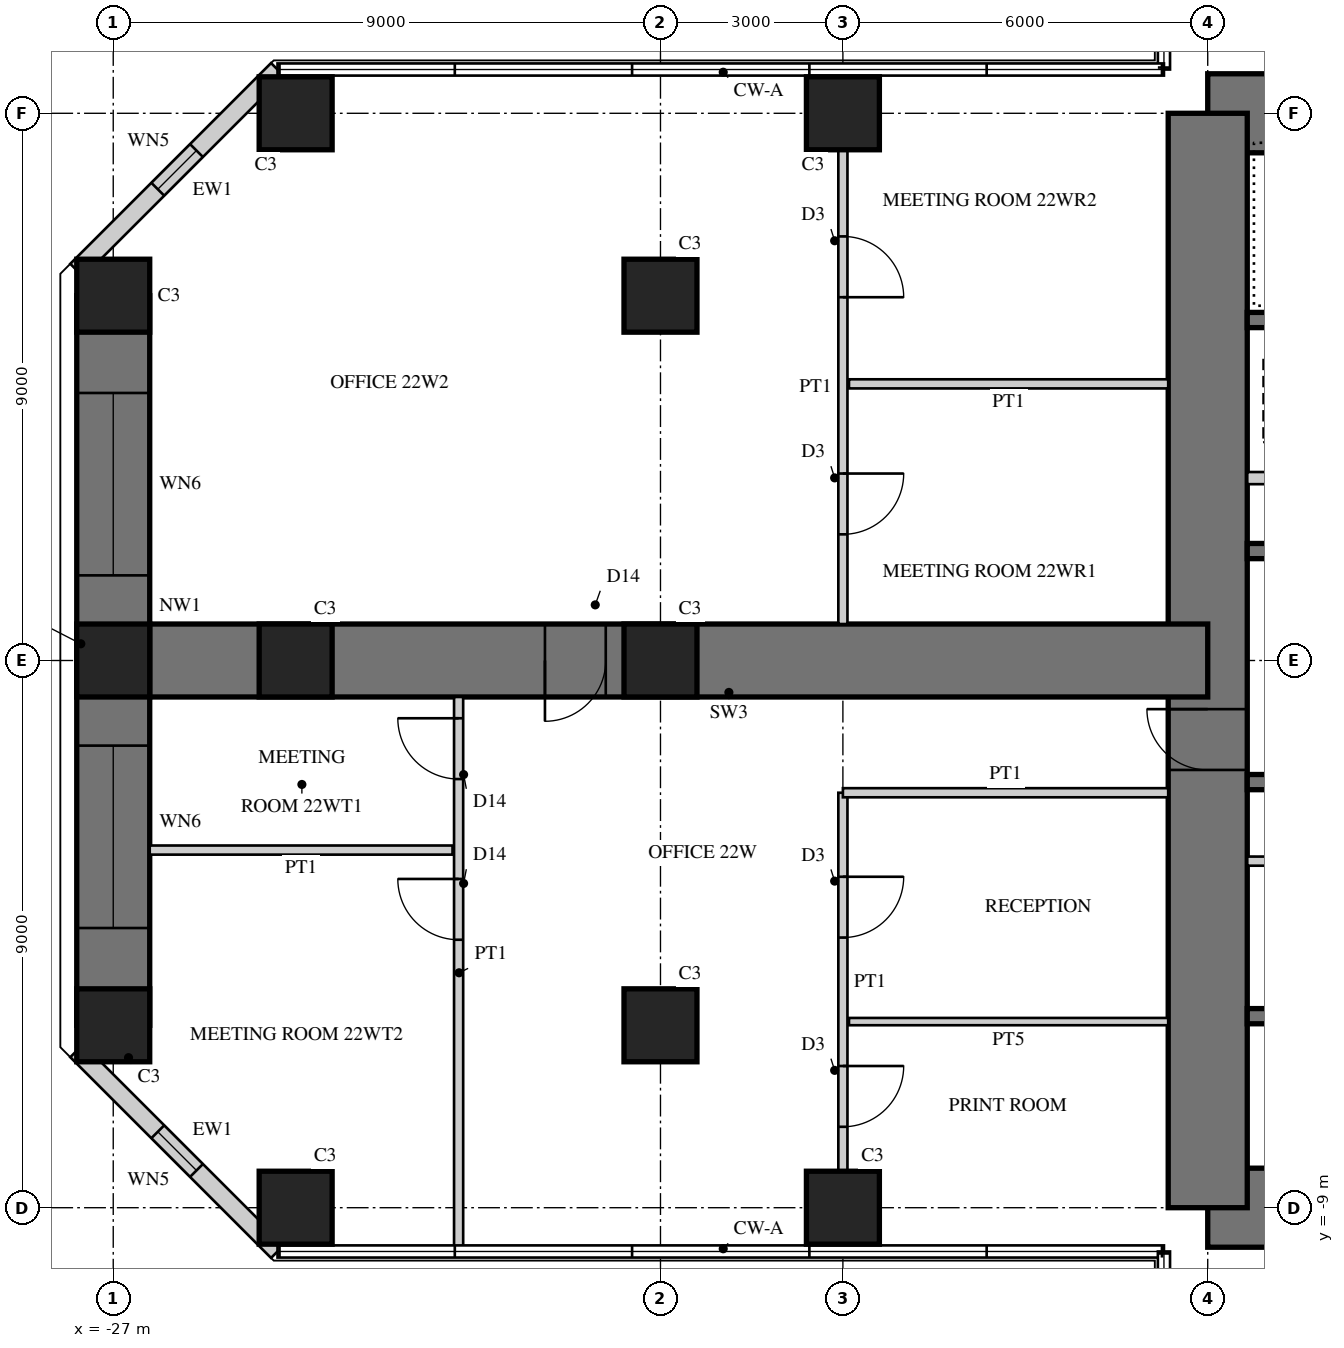
"""IFC4 building model, lengths in metres.
Left out: names, types, materials, properties, quantities, classifications, styles, units other than length and angle.
Written with IfcOpenShell. Run it as: python <this file> out.ifc"""

import sys

from ifc_helpers import new_model, si_unit, direction, frame, frame_2d, origin, origin_2d, place, context, subcontext, project, spatial, rectangle, hollow_rectangle, extrude, element, fill, save


model = new_model("IFC4")
c1 = context("Model", 3, precision=1e-05, world=origin(), true_north=direction((0.0, 1.0)))
c2 = subcontext(c1, "Body", "Model", "MODEL_VIEW")
j1 = project(units=[si_unit("LENGTHUNIT", "METRE"), si_unit("PLANEANGLEUNIT", "RADIAN")], contexts=[c1])
p1 = place(None, origin())
s1 = spatial("IfcSite", under=j1, at=p1, CompositionType="ELEMENT")
p2 = place(p1, origin())
s2 = spatial("IfcBuilding", under=s1, at=p2, CompositionType="ELEMENT")
p3 = place(p2, frame((0.0, 0.0, 91.5)))
s3 = spatial("IfcBuildingStorey", under=s2, at=p3, CompositionType="ELEMENT", Elevation=91.5)
p4 = place(p3, frame((9.0, 9.0, 0.0), z_axis=(0.0, 0.0, 1.0), x_axis=(-1.0, 0.0, 0.0)))
e1 = element("IfcWall", 1, at=p4, inside=s3, PredefinedType="SHEAR", context=c2, shape_type="SweptSolid", body=[
    extrude(rectangle(XDim=18.0, YDim=1.3, at=frame_2d((9.0, 0.0))), origin(), (0.0, 0.0, 1.0), 4.0),
])
p5 = place(p4, frame((9.8, 0.0, 0.0)))
e2 = element("IfcOpeningElement", 2, at=p5, cuts=e1, PredefinedType="OPENING", context=c2, shape_type="SweptSolid", body=[
    extrude(rectangle(XDim=1.0, YDim=2.4, at=frame_2d((0.5, 1.2))), frame((0.0, 0.66, 0.0), z_axis=(0.0, -1.0, 0.0), x_axis=(1.0, 0.0, 0.0)), (0.0, 0.0, 1.0), 1.32),
])
p6 = place(p3, frame((-9.0, -9.0, 0.0), z_axis=(0.0, 0.0, 1.0), x_axis=(1.0, 0.0, 0.0)))
e3 = element("IfcWall", 3, at=p6, inside=s3, PredefinedType="SHEAR", context=c2, shape_type="SweptSolid", body=[
    extrude(rectangle(XDim=18.0, YDim=1.3, at=frame_2d((9.0, 0.0))), origin(), (0.0, 0.0, 1.0), 4.0),
])
p7 = place(p6, frame((9.8, 0.0, 0.0)))
e4 = element("IfcOpeningElement", 4, at=p7, cuts=e3, PredefinedType="OPENING", context=c2, shape_type="SweptSolid", body=[
    extrude(rectangle(XDim=1.0, YDim=2.4, at=frame_2d((0.5, 1.2))), frame((0.0, 0.66, 0.0), z_axis=(0.0, -1.0, 0.0), x_axis=(1.0, 0.0, 0.0)), (0.0, 0.0, 1.0), 1.32),
])
p8 = place(p3, frame((-9.0, 9.0, 0.0), z_axis=(0.0, 0.0, 1.0), x_axis=(0.0, -1.0, 0.0)))
e5 = element("IfcWall", 5, at=p8, inside=s3, PredefinedType="SHEAR", context=c2, shape_type="SweptSolid", body=[
    extrude(rectangle(XDim=18.0, YDim=1.3, at=frame_2d((9.0, 0.0))), origin(), (0.0, 0.0, 1.0), 4.0),
])
p9 = place(p8, frame((9.8, 0.0, 0.0)))
e6 = element("IfcOpeningElement", 6, at=p9, cuts=e5, PredefinedType="OPENING", context=c2, shape_type="SweptSolid", body=[
    extrude(rectangle(XDim=1.0, YDim=2.4, at=frame_2d((0.5, 1.2))), frame((0.0, 0.66, 0.0), z_axis=(0.0, -1.0, 0.0), x_axis=(1.0, 0.0, 0.0)), (0.0, 0.0, 1.0), 1.32),
])
p10 = place(p3, frame((-2.125, 1.8, 0.0), z_axis=(0.0, 0.0, 1.0), x_axis=(-1.0, 0.0, 0.0)))
e7 = element("IfcWall", 7, at=p10, inside=s3, PredefinedType="SHEAR", context=c2, shape_type="SweptSolid", body=[
    extrude(rectangle(XDim=6.225, YDim=0.25, at=frame_2d((3.113, 0.0))), origin(), (0.0, 0.0, 1.0), 4.0),
])
p11 = place(p3, frame((-2.125, 5.6, 0.0), z_axis=(0.0, 0.0, 1.0), x_axis=(-1.0, 0.0, 0.0)))
e8 = element("IfcWall", 8, at=p11, inside=s3, PredefinedType="SHEAR", context=c2, shape_type="SweptSolid", body=[
    extrude(rectangle(XDim=6.225, YDim=0.25, at=frame_2d((3.113, 0.0))), origin(), (0.0, 0.0, 1.0), 4.0),
])
p12 = place(p11, frame((0.175, 0.0, 0.0)))
e9 = element("IfcOpeningElement", 9, at=p12, cuts=e8, PredefinedType="OPENING", context=c2, shape_type="SweptSolid", body=[
    extrude(rectangle(XDim=1.0, YDim=2.1, at=frame_2d((0.5, 1.05))), frame((0.0, 0.135, 0.0), z_axis=(0.0, -1.0, 0.0), x_axis=(1.0, 0.0, 0.0)), (0.0, 0.0, 1.0), 0.27),
])
p13 = place(p3, frame((-5.725, 3.0, 0.0), z_axis=(0.0, 0.0, 1.0), x_axis=(-1.0, 0.0, 0.0)))
e10 = element("IfcWall", 10, at=p13, inside=s3, PredefinedType="PARTITIONING", context=c2, shape_type="SweptSolid", body=[
    extrude(rectangle(XDim=2.625, YDim=0.2, at=frame_2d((1.312, 0.0))), origin(), (0.0, 0.0, 1.0), 4.0),
])
for number, where, z_axis, x_axis in (
    (11, (-1.925, -2.0, 0.0), (0.0, 0.0, 1.0), (-1.0, 0.0, 0.0)),
    (12, (-1.925, -5.85, 0.0), (0.0, 0.0, 1.0), (-1.0, 0.0, 0.0)),
):
    element("IfcWall", number, at=place(p3, frame(where, z_axis=z_axis, x_axis=x_axis)), inside=s3, PredefinedType="SHEAR", context=c2, shape_type="SweptSolid", body=[
        extrude(rectangle(XDim=6.425, YDim=0.25, at=frame_2d((3.212, 0.0))), origin(), (0.0, 0.0, 1.0), 4.0),
    ])
p14 = place(p3, frame((-1.925, -3.3, 0.0), z_axis=(0.0, 0.0, 1.0), x_axis=(-1.0, 0.0, 0.0)))
e13 = element("IfcWall", 13, at=p14, inside=s3, PredefinedType="PARTITIONING", context=c2, shape_type="SweptSolid", body=[
    extrude(rectangle(XDim=6.425, YDim=0.15, at=frame_2d((3.212, 0.0))), origin(), (0.0, 0.0, 1.0), 4.0),
])
p15 = place(p14, frame((0.075, 0.0, 0.0)))
e14 = element("IfcOpeningElement", 14, at=p15, cuts=e13, PredefinedType="OPENING", context=c2, shape_type="SweptSolid", body=[
    extrude(rectangle(XDim=0.8, YDim=2.1, at=frame_2d((0.4, 1.05))), frame((0.0, 0.085, 0.0), z_axis=(0.0, -1.0, 0.0), x_axis=(1.0, 0.0, 0.0)), (0.0, 0.0, 1.0), 0.17),
])
p16 = place(p14, frame((3.675, 0.0, 0.0)))
e15 = element("IfcOpeningElement", 15, at=p16, cuts=e13, PredefinedType="OPENING", context=c2, shape_type="SweptSolid", body=[
    extrude(rectangle(XDim=0.8, YDim=2.1, at=frame_2d((0.4, 1.05))), frame((0.0, 0.085, 0.0), z_axis=(0.0, -1.0, 0.0), x_axis=(1.0, 0.0, 0.0)), (0.0, 0.0, 1.0), 0.17),
])
p17 = place(p3, frame((-9.0, 0.0, 0.0), z_axis=(0.0, 0.0, 1.0), x_axis=(-1.0, 0.0, 0.0)))
e16 = element("IfcWall", 16, at=p17, inside=s3, PredefinedType="SHEAR", context=c2, shape_type="SweptSolid", body=[
    extrude(rectangle(XDim=18.0, YDim=1.2, at=frame_2d((9.0, 0.0))), origin(), (0.0, 0.0, 1.0), 4.0),
])
p18 = place(p17, frame((9.9, 0.0, 0.0)))
e17 = element("IfcOpeningElement", 17, at=p18, cuts=e16, PredefinedType="OPENING", context=c2, shape_type="SweptSolid", body=[
    extrude(rectangle(XDim=1.0, YDim=2.2, at=frame_2d((0.5, 1.1))), frame((0.0, 0.61, 0.0), z_axis=(0.0, -1.0, 0.0), x_axis=(1.0, 0.0, 0.0)), (0.0, 0.0, 1.0), 1.22),
])
p19 = place(p3, frame((-27.0, 6.0, 0.0), z_axis=(0.0, 0.0, 1.0), x_axis=(0.0, -1.0, 0.0)))
e18 = element("IfcWall", 18, at=p19, inside=s3, PredefinedType="SHEAR", context=c2, shape_type="SweptSolid", body=[
    extrude(rectangle(XDim=12.0, YDim=1.2, at=frame_2d((6.0, 0.0))), origin(), (0.0, 0.0, 1.0), 4.0),
])
p20 = place(p19, frame((1.6, 0.0, 0.6)))
e19 = element("IfcOpeningElement", 19, at=p20, cuts=e18, PredefinedType="OPENING", context=c2, shape_type="SweptSolid", body=[
    extrude(rectangle(XDim=3.0, YDim=2.4, at=frame_2d((1.5, 1.2))), frame((0.0, 0.61, 0.0), z_axis=(0.0, -1.0, 0.0), x_axis=(1.0, 0.0, 0.0)), (0.0, 0.0, 1.0), 1.22),
])
p21 = place(p19, frame((7.4, 0.0, 0.6)))
e20 = element("IfcOpeningElement", 20, at=p21, cuts=e18, PredefinedType="OPENING", context=c2, shape_type="SweptSolid", body=[
    extrude(rectangle(XDim=3.0, YDim=2.4, at=frame_2d((1.5, 1.2))), frame((0.0, 0.61, 0.0), z_axis=(0.0, -1.0, 0.0), x_axis=(1.0, 0.0, 0.0)), (0.0, 0.0, 1.0), 1.22),
])
for number, where, z_axis, x_axis in (
    (21, (-15.0, 9.0, 0.0), (0.0, 0.0, 1.0), (1.0, 0.0, 0.0)),
    (22, (-24.0, 9.0, 0.0), (0.0, 0.0, 1.0), (1.0, 0.0, 0.0)),
    (23, (-15.0, -9.0, 0.0), (0.0, 0.0, 1.0), (1.0, 0.0, 0.0)),
    (24, (-24.0, -9.0, 0.0), (0.0, 0.0, 1.0), (1.0, 0.0, 0.0)),
    (25, (-27.0, 6.0, 0.0), (0.0, 0.0, 1.0), (1.0, 0.0, 0.0)),
    (26, (-27.0, 0.0, 0.0), (0.0, 0.0, 1.0), (1.0, 0.0, 0.0)),
    (27, (-27.0, -6.0, 0.0), (0.0, 0.0, 1.0), (1.0, 0.0, 0.0)),
    (28, (-18.0, 6.0, 0.0), (0.0, 0.0, 1.0), (1.0, 0.0, 0.0)),
    (29, (-18.0, 0.0, 0.0), (0.0, 0.0, 1.0), (1.0, 0.0, 0.0)),
    (30, (-18.0, -6.0, 0.0), (0.0, 0.0, 1.0), (1.0, 0.0, 0.0)),
    (31, (-24.0, 0.0, 0.0), (0.0, 0.0, 1.0), (1.0, 0.0, 0.0)),
):
    element("IfcColumn", number, at=place(p3, frame(where, z_axis=z_axis, x_axis=x_axis)), inside=s3, PredefinedType="COLUMN", context=c2, shape_type="SweptSolid", body=[
        extrude(rectangle(XDim=1.2, YDim=1.2, at=origin_2d()), origin(), (0.0, 0.0, 1.0), 4.0),
    ])
p22 = place(p3, frame((-24.298, 9.72, 0.0), z_axis=(0.0, 0.0, 1.0), x_axis=(-0.707106781187, -0.707106781187, 0.0)))
e32 = element("IfcWall", 32, at=p22, inside=s3, PredefinedType="SOLIDWALL", context=c2, shape_type="SweptSolid", body=[
    extrude(rectangle(XDim=4.669, YDim=0.3, at=frame_2d((2.335, 0.0))), origin(), (0.0, 0.0, 1.0), 3.75),
])
p23 = place(p22, frame((1.885, 0.0, 0.3)))
e33 = element("IfcOpeningElement", 33, at=p23, cuts=e32, PredefinedType="OPENING", context=c2, shape_type="SweptSolid", body=[
    extrude(rectangle(XDim=0.9, YDim=2.4, at=frame_2d((0.45, 1.2))), frame((0.0, 0.16, 0.0), z_axis=(0.0, -1.0, 0.0), x_axis=(1.0, 0.0, 0.0)), (0.0, 0.0, 1.0), 0.32),
])
p24 = place(p3, frame((-27.6, -6.418, 0.0), z_axis=(0.0, 0.0, 1.0), x_axis=(0.707106781187, -0.707106781187, 0.0)))
e34 = element("IfcWall", 34, at=p24, inside=s3, PredefinedType="SOLIDWALL", context=c2, shape_type="SweptSolid", body=[
    extrude(rectangle(XDim=4.669, YDim=0.3, at=frame_2d((2.335, 0.0))), origin(), (0.0, 0.0, 1.0), 3.75),
])
p25 = place(p24, frame((1.885, 0.0, 0.3)))
e35 = element("IfcOpeningElement", 35, at=p25, cuts=e34, PredefinedType="OPENING", context=c2, shape_type="SweptSolid", body=[
    extrude(rectangle(XDim=0.9, YDim=2.4, at=frame_2d((0.45, 1.2))), frame((0.0, 0.16, 0.0), z_axis=(0.0, -1.0, 0.0), x_axis=(1.0, 0.0, 0.0)), (0.0, 0.0, 1.0), 0.32),
])
p26 = place(p3, frame((-15.0, -2.175, 0.0), z_axis=(0.0, 0.0, 1.0), x_axis=(0.0, -1.0, 0.0)))
e36 = element("IfcWall", 36, at=p26, inside=s3, PredefinedType="PARTITIONING", context=c2, shape_type="SweptSolid", body=[
    extrude(rectangle(XDim=6.225, YDim=0.15, at=frame_2d((3.112, 0.0))), origin(), (0.0, 0.0, 1.0), 2.7),
])
p27 = place(p26, frame((1.382, 0.0, 0.0)))
e37 = element("IfcOpeningElement", 37, at=p27, cuts=e36, PredefinedType="OPENING", context=c2, shape_type="SweptSolid", body=[
    extrude(rectangle(XDim=1.0, YDim=2.1, at=frame_2d((0.5, 1.05))), frame((0.0, 0.085, 0.0), z_axis=(0.0, -1.0, 0.0), x_axis=(1.0, 0.0, 0.0)), (0.0, 0.0, 1.0), 0.17),
])
p28 = place(p26, frame((4.494, 0.0, 0.0)))
e38 = element("IfcOpeningElement", 38, at=p28, cuts=e36, PredefinedType="OPENING", context=c2, shape_type="SweptSolid", body=[
    extrude(rectangle(XDim=1.0, YDim=2.1, at=frame_2d((0.5, 1.05))), frame((0.0, 0.085, 0.0), z_axis=(0.0, -1.0, 0.0), x_axis=(1.0, 0.0, 0.0)), (0.0, 0.0, 1.0), 0.17),
])
p29 = place(p3, frame((-9.65, -2.175, 0.0), z_axis=(0.0, 0.0, 1.0), x_axis=(-1.0, 0.0, 0.0)))
e39 = element("IfcWall", 39, at=p29, inside=s3, PredefinedType="PARTITIONING", context=c2, shape_type="SweptSolid", body=[
    extrude(rectangle(XDim=5.35, YDim=0.15, at=frame_2d((2.675, 0.0))), origin(), (0.0, 0.0, 1.0), 3.75),
])
p30 = place(p3, frame((-9.65, -5.939, 0.0), z_axis=(0.0, 0.0, 1.0), x_axis=(-1.0, 0.0, 0.0)))
e40 = element("IfcWall", 40, at=p30, inside=s3, PredefinedType="PLUMBINGWALL", context=c2, shape_type="SweptSolid", body=[
    extrude(rectangle(XDim=5.25, YDim=0.12, at=frame_2d((2.625, 0.0))), origin(), (0.0, 0.0, 1.0), 2.8),
])
p31 = place(p3, frame((-15.0, 8.4, 0.0), z_axis=(0.0, 0.0, 1.0), x_axis=(0.0, -1.0, 0.0)))
e41 = element("IfcWall", 41, at=p31, inside=s3, PredefinedType="PARTITIONING", context=c2, shape_type="SweptSolid", body=[
    extrude(rectangle(XDim=7.8, YDim=0.15, at=frame_2d((3.9, 0.0))), origin(), (0.0, 0.0, 1.0), 2.7),
])
p32 = place(p31, frame((1.425, 0.0, 0.0)))
e42 = element("IfcOpeningElement", 42, at=p32, cuts=e41, PredefinedType="OPENING", context=c2, shape_type="SweptSolid", body=[
    extrude(rectangle(XDim=1.0, YDim=2.1, at=frame_2d((0.5, 1.05))), frame((0.0, 0.085, 0.0), z_axis=(0.0, -1.0, 0.0), x_axis=(1.0, 0.0, 0.0)), (0.0, 0.0, 1.0), 0.17),
])
p33 = place(p31, frame((5.325, 0.0, 0.0)))
e43 = element("IfcOpeningElement", 43, at=p33, cuts=e41, PredefinedType="OPENING", context=c2, shape_type="SweptSolid", body=[
    extrude(rectangle(XDim=1.0, YDim=2.1, at=frame_2d((0.5, 1.05))), frame((0.0, 0.085, 0.0), z_axis=(0.0, -1.0, 0.0), x_axis=(1.0, 0.0, 0.0)), (0.0, 0.0, 1.0), 0.17),
])
p34 = place(p3, frame((-9.65, 4.55, 0.0), z_axis=(0.0, 0.0, 1.0), x_axis=(-1.0, 0.0, 0.0)))
e44 = element("IfcWall", 44, at=p34, inside=s3, PredefinedType="PARTITIONING", context=c2, shape_type="SweptSolid", body=[
    extrude(rectangle(XDim=5.25, YDim=0.15, at=frame_2d((2.625, 0.0))), origin(), (0.0, 0.0, 1.0), 3.75),
])
p35 = place(p3, frame((-21.42, -3.118, 0.0), z_axis=(0.0, 0.0, 1.0), x_axis=(-1.0, 0.0, 0.0)))
e45 = element("IfcWall", 45, at=p35, inside=s3, PredefinedType="PARTITIONING", context=c2, shape_type="SweptSolid", body=[
    extrude(rectangle(XDim=4.98, YDim=0.15, at=frame_2d((2.49, 0.0))), origin(), (0.0, 0.0, 1.0), 3.75),
])
p36 = place(p3, frame((-21.32, -0.6, 0.0), z_axis=(0.0, 0.0, 1.0), x_axis=(0.0, -1.0, 0.0)))
e46 = element("IfcWall", 46, at=p36, inside=s3, PredefinedType="PARTITIONING", context=c2, shape_type="SweptSolid", body=[
    extrude(rectangle(XDim=9.08, YDim=0.15, at=frame_2d((4.54, 0.0))), origin(), (0.0, 0.0, 1.0), 3.75),
])
p37 = place(p36, frame((0.35, 0.0, 0.0)))
e47 = element("IfcOpeningElement", 47, at=p37, cuts=e46, PredefinedType="OPENING", context=c2, shape_type="SweptSolid", body=[
    extrude(rectangle(XDim=1.0, YDim=2.2, at=frame_2d((0.5, 1.1))), frame((0.0, 0.085, 0.0), z_axis=(0.0, -1.0, 0.0), x_axis=(1.0, 0.0, 0.0)), (0.0, 0.0, 1.0), 0.17),
])
p38 = place(p36, frame((2.993, 0.0, 0.0)))
e48 = element("IfcOpeningElement", 48, at=p38, cuts=e46, PredefinedType="OPENING", context=c2, shape_type="SweptSolid", body=[
    extrude(rectangle(XDim=1.0, YDim=2.2, at=frame_2d((0.5, 1.1))), frame((0.0, 0.085, 0.0), z_axis=(0.0, -1.0, 0.0), x_axis=(1.0, 0.0, 0.0)), (0.0, 0.0, 1.0), 0.17),
])
p39 = place(p23, origin())
e49 = element("IfcWindow", 49, at=p39, inside=s3, PartitioningType="SINGLE_PANEL", PredefinedType="WINDOW", context=c2, shape_type="SweptSolid", body=[
    extrude(hollow_rectangle(XDim=0.9, YDim=2.4, WallThickness=0.06, at=frame_2d((0.45, 1.2))), frame((0.0, 0.03, 0.0), z_axis=(0.0, -1.0, 0.0), x_axis=(1.0, 0.0, 0.0)), (0.0, 0.0, 1.0), 0.06),
    extrude(rectangle(XDim=0.779, YDim=2.279, at=frame_2d((0.45, 1.2))), frame((0.0, 0.03, 0.0), z_axis=(0.0, -1.0, 0.0), x_axis=(1.0, 0.0, 0.0)), (0.0, 0.0, 1.0), 0.06),
])
fill(e33, e49)
p40 = place(p20, origin())
e50 = element("IfcWindow", 50, at=p40, inside=s3, PartitioningType="SINGLE_PANEL", PredefinedType="WINDOW", context=c2, shape_type="SweptSolid", body=[
    extrude(hollow_rectangle(XDim=3.0, YDim=2.4, WallThickness=0.06, at=frame_2d((1.5, 1.2))), frame((0.0, 0.03, 0.0), z_axis=(0.0, -1.0, 0.0), x_axis=(1.0, 0.0, 0.0)), (0.0, 0.0, 1.0), 0.06),
    extrude(rectangle(XDim=2.879, YDim=2.279, at=frame_2d((1.5, 1.2))), frame((0.0, 0.03, 0.0), z_axis=(0.0, -1.0, 0.0), x_axis=(1.0, 0.0, 0.0)), (0.0, 0.0, 1.0), 0.06),
])
fill(e19, e50)
p41 = place(p21, origin())
e51 = element("IfcWindow", 51, at=p41, inside=s3, PartitioningType="SINGLE_PANEL", PredefinedType="WINDOW", context=c2, shape_type="SweptSolid", body=[
    extrude(hollow_rectangle(XDim=3.0, YDim=2.4, WallThickness=0.06, at=frame_2d((1.5, 1.2))), frame((0.0, 0.03, 0.0), z_axis=(0.0, -1.0, 0.0), x_axis=(1.0, 0.0, 0.0)), (0.0, 0.0, 1.0), 0.06),
    extrude(rectangle(XDim=2.879, YDim=2.279, at=frame_2d((1.5, 1.2))), frame((0.0, 0.03, 0.0), z_axis=(0.0, -1.0, 0.0), x_axis=(1.0, 0.0, 0.0)), (0.0, 0.0, 1.0), 0.06),
])
fill(e20, e51)
p42 = place(p25, origin())
e52 = element("IfcWindow", 52, at=p42, inside=s3, PartitioningType="SINGLE_PANEL", PredefinedType="WINDOW", context=c2, shape_type="SweptSolid", body=[
    extrude(hollow_rectangle(XDim=0.9, YDim=2.4, WallThickness=0.06, at=frame_2d((0.45, 1.2))), frame((0.0, 0.03, 0.0), z_axis=(0.0, -1.0, 0.0), x_axis=(1.0, 0.0, 0.0)), (0.0, 0.0, 1.0), 0.06),
    extrude(rectangle(XDim=0.779, YDim=2.279, at=frame_2d((0.45, 1.2))), frame((0.0, 0.03, 0.0), z_axis=(0.0, -1.0, 0.0), x_axis=(1.0, 0.0, 0.0)), (0.0, 0.0, 1.0), 0.06),
])
fill(e35, e52)
p43 = place(p27, origin())
e53 = element("IfcDoor", 53, at=p43, inside=s3, OperationType="SINGLE_SWING_LEFT", PredefinedType="DOOR", context=c2, shape_type="SweptSolid", body=[
    extrude(rectangle(XDim=1.0, YDim=2.1, at=frame_2d((0.5, 1.05))), frame((0.0, 0.025, 0.0), z_axis=(0.0, -1.0, 0.0), x_axis=(1.0, 0.0, 0.0)), (0.0, 0.0, 1.0), 0.05),
])
fill(e37, e53)
p44 = place(p28, origin())
e54 = element("IfcDoor", 54, at=p44, inside=s3, OperationType="SINGLE_SWING_LEFT", PredefinedType="DOOR", context=c2, shape_type="SweptSolid", body=[
    extrude(rectangle(XDim=1.0, YDim=2.1, at=frame_2d((0.5, 1.05))), frame((0.0, 0.025, 0.0), z_axis=(0.0, -1.0, 0.0), x_axis=(1.0, 0.0, 0.0)), (0.0, 0.0, 1.0), 0.05),
])
fill(e38, e54)
p45 = place(p32, origin())
e55 = element("IfcDoor", 55, at=p45, inside=s3, OperationType="SINGLE_SWING_RIGHT", PredefinedType="DOOR", context=c2, shape_type="SweptSolid", body=[
    extrude(rectangle(XDim=1.0, YDim=2.1, at=frame_2d((0.5, 1.05))), frame((0.0, 0.025, 0.0), z_axis=(0.0, -1.0, 0.0), x_axis=(1.0, 0.0, 0.0)), (0.0, 0.0, 1.0), 0.05),
])
fill(e42, e55)
p46 = place(p33, origin())
e56 = element("IfcDoor", 56, at=p46, inside=s3, OperationType="SINGLE_SWING_LEFT", PredefinedType="DOOR", context=c2, shape_type="SweptSolid", body=[
    extrude(rectangle(XDim=1.0, YDim=2.1, at=frame_2d((0.5, 1.05))), frame((0.0, 0.025, 0.0), z_axis=(0.0, -1.0, 0.0), x_axis=(1.0, 0.0, 0.0)), (0.0, 0.0, 1.0), 0.05),
])
fill(e43, e56)
p47 = place(p37, frame((1.0, 0.0, 0.0), z_axis=(0.0, 0.0, 1.0), x_axis=(-1.0, 0.0, 0.0)))
e57 = element("IfcDoor", 57, at=p47, inside=s3, OperationType="SINGLE_SWING_RIGHT", PredefinedType="DOOR", context=c2, shape_type="SweptSolid", body=[
    extrude(rectangle(XDim=1.0, YDim=2.2, at=frame_2d((0.5, 1.1))), frame((0.0, 0.025, 0.0), z_axis=(0.0, -1.0, 0.0), x_axis=(1.0, 0.0, 0.0)), (0.0, 0.0, 1.0), 0.05),
])
fill(e47, e57)
p48 = place(p38, frame((1.0, 0.0, 0.0), z_axis=(0.0, 0.0, 1.0), x_axis=(-1.0, 0.0, 0.0)))
e58 = element("IfcDoor", 58, at=p48, inside=s3, OperationType="SINGLE_SWING_RIGHT", PredefinedType="DOOR", context=c2, shape_type="SweptSolid", body=[
    extrude(rectangle(XDim=1.0, YDim=2.2, at=frame_2d((0.5, 1.1))), frame((0.0, 0.025, 0.0), z_axis=(0.0, -1.0, 0.0), x_axis=(1.0, 0.0, 0.0)), (0.0, 0.0, 1.0), 0.05),
])
fill(e48, e58)
p49 = place(p18, origin())
e59 = element("IfcDoor", 59, at=p49, inside=s3, OperationType="SINGLE_SWING_RIGHT", PredefinedType="DOOR", context=c2, shape_type="SweptSolid", body=[
    extrude(rectangle(XDim=1.0, YDim=2.2, at=frame_2d((0.5, 1.1))), frame((0.0, 0.025, 0.0), z_axis=(0.0, -1.0, 0.0), x_axis=(1.0, 0.0, 0.0)), (0.0, 0.0, 1.0), 0.05),
])
fill(e17, e59)
p50 = place(p9, frame((1.0, 0.0, 0.0), z_axis=(0.0, 0.0, 1.0), x_axis=(-1.0, 0.0, 0.0)))
e60 = element("IfcDoor", 60, at=p50, inside=s3, OperationType="SINGLE_SWING_RIGHT", PredefinedType="DOOR", context=c2, shape_type="SweptSolid", body=[
    extrude(rectangle(XDim=1.0, YDim=2.4, at=frame_2d((0.5, 1.2))), frame((0.0, -0.005, 0.0), z_axis=(0.0, -1.0, 0.0), x_axis=(1.0, 0.0, 0.0)), (0.0, 0.0, 1.0), 0.05),
])
fill(e6, e60)
save(model, sys.argv[1])
